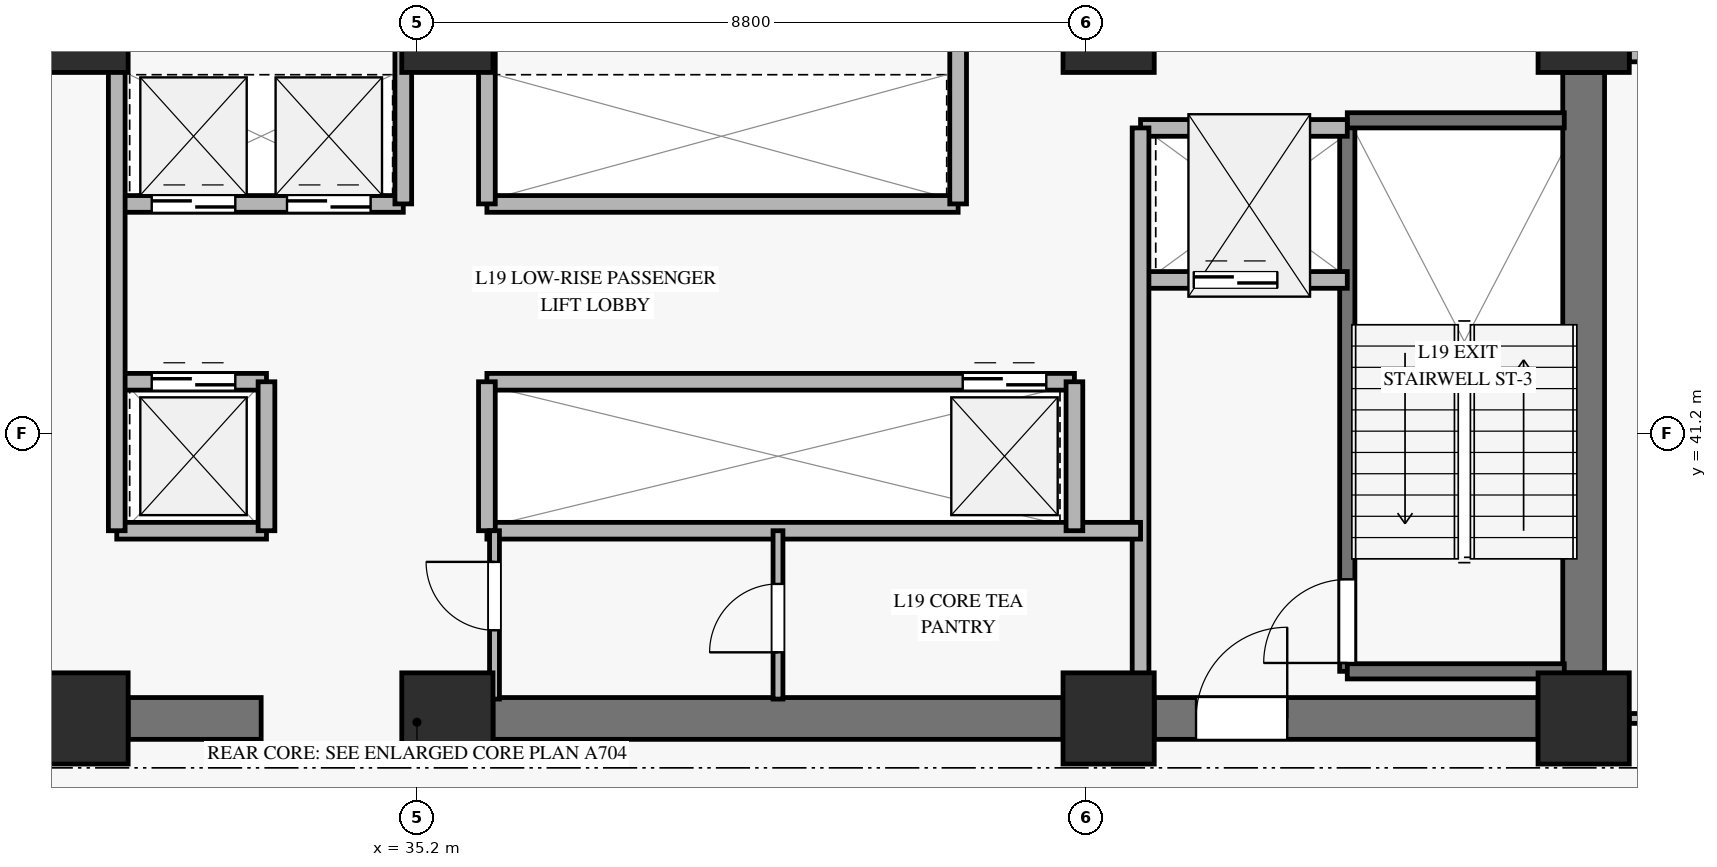
"""IFC4 building model, lengths in metres.
Left out: names, types, materials, properties, quantities, classifications, styles, units other than length and angle.
Written with IfcOpenShell. Run it as: python <this file> out.ifc"""

import sys

from ifc_helpers import new_model, si_unit, direction, frame, frame_2d, origin, origin_2d, place, context, subcontext, project, spatial, rectangle, extrude, source, transform, mapped, element, fill, save


model = new_model("IFC4")
c1 = context("Model", 3, precision=1e-05, world=origin(), true_north=direction((0.0, 1.0)))
c2 = subcontext(c1, "Body", "Model", "MODEL_VIEW")
j1 = project(units=[si_unit("LENGTHUNIT", "METRE"), si_unit("PLANEANGLEUNIT", "RADIAN")], contexts=[c1])
p1 = place(None, origin())
s1 = spatial("IfcSite", under=j1, at=p1, CompositionType="ELEMENT")
p2 = place(p1, origin())
s2 = spatial("IfcBuilding", under=s1, at=p2, CompositionType="ELEMENT")
p3 = place(p2, frame((0.0, 0.0, 79.6)))
s3 = spatial("IfcBuildingStorey", under=s2, at=p3, CompositionType="ELEMENT", Elevation=79.6)
m1 = source(origin(), c2, "Body", "SweptSolid", [
    extrude(rectangle(XDim=1.2, YDim=1.2, at=origin_2d()), origin(), (0.0, 0.0, 1.0), 3.68),
])
for number, where, z_axis, x_axis in (
    (1, (30.8, 37.45, 0.0), (0.0, 0.0, 1.0), (1.0, 0.0, 0.0)),
    (2, (30.8, 46.55, 0.0), (0.0, 0.0, 1.0), (1.0, 0.0, 0.0)),
    (3, (35.6, 37.45, 0.0), (0.0, 0.0, 1.0), (1.0, 0.0, 0.0)),
    (4, (35.6, 46.55, 0.0), (0.0, 0.0, 1.0), (1.0, 0.0, 0.0)),
    (5, (44.3, 37.45, 0.0), (0.0, 0.0, 1.0), (1.0, 0.0, 0.0)),
    (6, (44.3, 46.55, 0.0), (0.0, 0.0, 1.0), (1.0, 0.0, 0.0)),
    (7, (50.55, 37.45, 0.0), (0.0, 0.0, 1.0), (1.0, 0.0, 0.0)),
    (8, (50.55, 46.55, 0.0), (0.0, 0.0, 1.0), (1.0, 0.0, 0.0)),
):
    element("IfcColumn", number, at=place(p3, frame(where, z_axis=z_axis, x_axis=x_axis)), inside=s3, PredefinedType="PILASTER", context=c2, shape_type="MappedRepresentation", body=[
        mapped(m1, transform((0.0, 0.0, 0.0), x_axis=(1.0, 0.0, 0.0), y_axis=(0.0, 1.0, 0.0), z_axis=(0.0, 0.0, 1.0), scale=1.0)),
    ])
p4 = place(p3, frame((31.4, 37.45, 0.0), z_axis=(0.0, 0.0, 1.0), x_axis=(1.0, 0.0, 0.0)))
e9 = element("IfcWall", 9, at=p4, inside=s3, PredefinedType="SHEAR", context=c2, shape_type="SweptSolid", body=[
    extrude(rectangle(XDim=1.75, YDim=0.55, at=frame_2d((0.875, 0.0))), origin(), (0.0, 0.0, 1.0), 3.68),
])
p5 = place(p3, frame((36.2, 37.45, 0.0), z_axis=(0.0, 0.0, 1.0), x_axis=(1.0, 0.0, 0.0)))
e10 = element("IfcWall", 10, at=p5, inside=s3, PredefinedType="SHEAR", context=c2, shape_type="SweptSolid", body=[
    extrude(rectangle(XDim=7.5, YDim=0.55, at=frame_2d((3.75, 0.0))), origin(), (0.0, 0.0, 1.0), 3.68),
])
p6 = place(p3, frame((44.9, 37.45, 0.0), z_axis=(0.0, 0.0, 1.0), x_axis=(1.0, 0.0, 0.0)))
e11 = element("IfcWall", 11, at=p6, inside=s3, PredefinedType="SHEAR", context=c2, shape_type="SweptSolid", body=[
    extrude(rectangle(XDim=5.05, YDim=0.55, at=frame_2d((2.525, 0.0))), origin(), (0.0, 0.0, 1.0), 3.68),
])
p7 = place(p6, frame((0.55, 0.0, 0.0)))
e12 = element("IfcOpeningElement", 12, at=p7, cuts=e11, PredefinedType="OPENING", context=c2, shape_type="SweptSolid", body=[
    extrude(rectangle(XDim=1.2, YDim=2.15, at=frame_2d((0.6, 1.075))), frame((0.0, 0.285, 0.0), z_axis=(0.0, -1.0, 0.0), x_axis=(1.0, 0.0, 0.0)), (0.0, 0.0, 1.0), 0.57),
])
p8 = place(p3, frame((50.55, 38.05, 0.0), z_axis=(0.0, 0.0, 1.0), x_axis=(0.0, 1.0, 0.0)))
e13 = element("IfcWall", 13, at=p8, inside=s3, PredefinedType="SHEAR", context=c2, shape_type="SweptSolid", body=[
    extrude(rectangle(XDim=7.9, YDim=0.55, at=frame_2d((3.95, 0.0))), origin(), (0.0, 0.0, 1.0), 3.68),
])
p9 = place(p3, frame((51.15, 46.25, 0.0), z_axis=(0.0, 0.0, 1.0), x_axis=(1.0, 0.0, 0.0)))
e14 = element("IfcWall", 14, at=p9, inside=s3, PredefinedType="SOLIDWALL", context=c2, shape_type="SweptSolid", body=[
    extrude(rectangle(XDim=11.615, YDim=0.32, at=frame_2d((5.808, 0.0))), origin(), (0.0, 0.0, 1.0), 3.16),
])
p10 = place(p9, frame((5.008, 0.0, 0.45)))
e15 = element("IfcOpeningElement", 15, at=p10, cuts=e14, PredefinedType="OPENING", context=c2, shape_type="SweptSolid", body=[
    extrude(rectangle(XDim=1.6, YDim=2.0, at=frame_2d((0.8, 1.0))), frame((0.0, 0.17, 0.0), z_axis=(0.0, -1.0, 0.0), x_axis=(1.0, 0.0, 0.0)), (0.0, 0.0, 1.0), 0.34),
])
p11 = place(p3, frame((47.44, 38.07, 0.0), z_axis=(0.0, 0.0, 1.0), x_axis=(0.0, 1.0, 0.0)))
e16 = element("IfcWall", 16, at=p11, inside=s3, PredefinedType="SOLIDWALL", context=c2, shape_type="SweptSolid", body=[
    extrude(rectangle(XDim=7.25, YDim=0.2, at=frame_2d((3.625, 0.0))), origin(), (0.0, 0.0, 1.0), 3.9),
])
p12 = place(p11, frame((0.11, 0.0, 0.0)))
e17 = element("IfcOpeningElement", 17, at=p12, cuts=e16, PredefinedType="OPENING", context=c2, shape_type="SweptSolid", body=[
    extrude(rectangle(XDim=1.1, YDim=2.15, at=frame_2d((0.55, 1.075))), frame((0.0, 0.11, 0.0), z_axis=(0.0, -1.0, 0.0), x_axis=(1.0, 0.0, 0.0)), (0.0, 0.0, 1.0), 0.22),
])
for number, where, z_axis, x_axis in (
    (18, (47.44, 45.32, 0.0), (0.0, 0.0, 1.0), (1.0, 0.0, 0.0)),
    (19, (47.44, 38.07, 0.0), (0.0, 0.0, 1.0), (1.0, 0.0, 0.0)),
):
    element("IfcWall", number, at=place(p3, frame(where, z_axis=z_axis, x_axis=x_axis)), inside=s3, PredefinedType="SOLIDWALL", context=c2, shape_type="SweptSolid", body=[
        extrude(rectangle(XDim=2.855, YDim=0.2, at=frame_2d((1.427, 0.0))), origin(), (0.0, 0.0, 1.0), 3.9),
    ])
p13 = place(p3, frame((44.72, 43.22, 0.0), z_axis=(0.0, 0.0, 1.0), x_axis=(1.0, 0.0, 0.0)))
e20 = element("IfcWall", 20, at=p13, inside=s3, PredefinedType="SOLIDWALL", context=c2, shape_type="SweptSolid", body=[
    extrude(rectangle(XDim=2.72, YDim=0.22, at=frame_2d((1.36, 0.0))), origin(), (0.0, 0.0, 1.0), 3.68),
])
p14 = place(p13, frame((0.7, 0.0, 0.0)))
e21 = element("IfcOpeningElement", 21, at=p14, cuts=e20, PredefinedType="OPENING", context=c2, shape_type="SweptSolid", body=[
    extrude(rectangle(XDim=1.1, YDim=2.2, at=frame_2d((0.55, 1.1))), frame((0.0, 0.12, 0.0), z_axis=(0.0, -1.0, 0.0), x_axis=(1.0, 0.0, 0.0)), (0.0, 0.0, 1.0), 0.24),
])
p15 = place(p3, frame((44.72, 45.22, 0.0), z_axis=(0.0, 0.0, 1.0), x_axis=(1.0, 0.0, 0.0)))
e22 = element("IfcWall", 22, at=p15, inside=s3, PredefinedType="SOLIDWALL", context=c2, shape_type="SweptSolid", body=[
    extrude(rectangle(XDim=2.72, YDim=0.22, at=frame_2d((1.36, 0.0))), origin(), (0.0, 0.0, 1.0), 3.68),
])
p16 = place(p3, frame((44.72, 37.705, 0.0), z_axis=(0.0, 0.0, 1.0), x_axis=(0.0, 1.0, 0.0)))
e23 = element("IfcWall", 23, at=p16, inside=s3, PredefinedType="SOLIDWALL", context=c2, shape_type="SweptSolid", body=[
    extrude(rectangle(XDim=7.515, YDim=0.22, at=frame_2d((3.757, 0.0))), origin(), (0.0, 0.0, 1.0), 3.68),
])
p17 = place(p3, frame((31.25, 44.22, 0.0), z_axis=(0.0, 0.0, 1.0), x_axis=(1.0, 0.0, 0.0)))
e24 = element("IfcWall", 24, at=p17, inside=s3, PredefinedType="SOLIDWALL", context=c2, shape_type="SweptSolid", body=[
    extrude(rectangle(XDim=3.77, YDim=0.22, at=frame_2d((1.885, 0.0))), origin(), (0.0, 0.0, 1.0), 3.68),
])
p18 = place(p17, frame((0.46, 0.0, 0.0)))
e25 = element("IfcOpeningElement", 25, at=p18, cuts=e24, PredefinedType="OPENING", context=c2, shape_type="SweptSolid", body=[
    extrude(rectangle(XDim=1.1, YDim=2.2, at=frame_2d((0.55, 1.1))), frame((0.0, 0.12, 0.0), z_axis=(0.0, -1.0, 0.0), x_axis=(1.0, 0.0, 0.0)), (0.0, 0.0, 1.0), 0.24),
])
p19 = place(p17, frame((2.24, 0.0, 0.0)))
e26 = element("IfcOpeningElement", 26, at=p19, cuts=e24, PredefinedType="OPENING", context=c2, shape_type="SweptSolid", body=[
    extrude(rectangle(XDim=1.1, YDim=2.2, at=frame_2d((0.55, 1.1))), frame((0.0, 0.12, 0.0), z_axis=(0.0, -1.0, 0.0), x_axis=(1.0, 0.0, 0.0)), (0.0, 0.0, 1.0), 0.24),
])
p20 = place(p3, frame((36.12, 44.22, 0.0), z_axis=(0.0, 0.0, 1.0), x_axis=(1.0, 0.0, 0.0)))
e27 = element("IfcWall", 27, at=p20, inside=s3, PredefinedType="SOLIDWALL", context=c2, shape_type="SweptSolid", body=[
    extrude(rectangle(XDim=6.2, YDim=0.22, at=frame_2d((3.1, 0.0))), origin(), (0.0, 0.0, 1.0), 3.68),
])
for number, where, z_axis, x_axis in (
    (28, (35.02, 44.22, 0.0), (0.0, 0.0, 1.0), (0.0, 1.0, 0.0)),
    (29, (36.12, 44.22, 0.0), (0.0, 0.0, 1.0), (0.0, 1.0, 0.0)),
    (30, (42.32, 44.22, 0.0), (0.0, 0.0, 1.0), (0.0, 1.0, 0.0)),
):
    element("IfcWall", number, at=place(p3, frame(where, z_axis=z_axis, x_axis=x_axis)), inside=s3, PredefinedType="SOLIDWALL", context=c2, shape_type="SweptSolid", body=[
        extrude(rectangle(XDim=2.075, YDim=0.22, at=frame_2d((1.038, 0.0))), origin(), (0.0, 0.0, 1.0), 3.68),
    ])
p21 = place(p3, frame((31.25, 41.88, 0.0), z_axis=(0.0, 0.0, 1.0), x_axis=(1.0, 0.0, 0.0)))
e31 = element("IfcWall", 31, at=p21, inside=s3, PredefinedType="SOLIDWALL", context=c2, shape_type="SweptSolid", body=[
    extrude(rectangle(XDim=1.97, YDim=0.22, at=frame_2d((0.985, 0.0))), origin(), (0.0, 0.0, 1.0), 3.68),
])
p22 = place(p21, frame((0.46, 0.0, 0.0)))
e32 = element("IfcOpeningElement", 32, at=p22, cuts=e31, PredefinedType="OPENING", context=c2, shape_type="SweptSolid", body=[
    extrude(rectangle(XDim=1.1, YDim=2.2, at=frame_2d((0.55, 1.1))), frame((0.0, 0.12, 0.0), z_axis=(0.0, -1.0, 0.0), x_axis=(1.0, 0.0, 0.0)), (0.0, 0.0, 1.0), 0.24),
])
p23 = place(p3, frame((36.12, 41.88, 0.0), z_axis=(0.0, 0.0, 1.0), x_axis=(1.0, 0.0, 0.0)))
e33 = element("IfcWall", 33, at=p23, inside=s3, PredefinedType="SOLIDWALL", context=c2, shape_type="SweptSolid", body=[
    extrude(rectangle(XDim=7.73, YDim=0.22, at=frame_2d((3.865, 0.0))), origin(), (0.0, 0.0, 1.0), 3.68),
])
p24 = place(p23, frame((6.26, 0.0, 0.0)))
e34 = element("IfcOpeningElement", 34, at=p24, cuts=e33, PredefinedType="OPENING", context=c2, shape_type="SweptSolid", body=[
    extrude(rectangle(XDim=1.1, YDim=2.2, at=frame_2d((0.55, 1.1))), frame((0.0, 0.12, 0.0), z_axis=(0.0, -1.0, 0.0), x_axis=(1.0, 0.0, 0.0)), (0.0, 0.0, 1.0), 0.24),
])
p25 = place(p3, frame((31.25, 39.92, 0.0), z_axis=(0.0, 0.0, 1.0), x_axis=(1.0, 0.0, 0.0)))
e35 = element("IfcWall", 35, at=p25, inside=s3, PredefinedType="SOLIDWALL", context=c2, shape_type="SweptSolid", body=[
    extrude(rectangle(XDim=1.97, YDim=0.22, at=frame_2d((0.985, 0.0))), origin(), (0.0, 0.0, 1.0), 3.68),
])
p26 = place(p3, frame((33.22, 39.92, 0.0), z_axis=(0.0, 0.0, 1.0), x_axis=(0.0, 1.0, 0.0)))
e36 = element("IfcWall", 36, at=p26, inside=s3, PredefinedType="SOLIDWALL", context=c2, shape_type="SweptSolid", body=[
    extrude(rectangle(XDim=1.96, YDim=0.22, at=frame_2d((0.98, 0.0))), origin(), (0.0, 0.0, 1.0), 3.68),
])
p27 = place(p3, frame((36.12, 39.92, 0.0), z_axis=(0.0, 0.0, 1.0), x_axis=(1.0, 0.0, 0.0)))
e37 = element("IfcWall", 37, at=p27, inside=s3, PredefinedType="SOLIDWALL", context=c2, shape_type="SweptSolid", body=[
    extrude(rectangle(XDim=8.6, YDim=0.22, at=frame_2d((4.3, 0.0))), origin(), (0.0, 0.0, 1.0), 2.965),
])
p28 = place(p3, frame((36.12, 39.92, 0.0), z_axis=(0.0, 0.0, 1.0), x_axis=(0.0, 1.0, 0.0)))
e38 = element("IfcWall", 38, at=p28, inside=s3, PredefinedType="SOLIDWALL", context=c2, shape_type="SweptSolid", body=[
    extrude(rectangle(XDim=1.96, YDim=0.22, at=frame_2d((0.98, 0.0))), origin(), (0.0, 0.0, 1.0), 3.68),
])
p29 = place(p3, frame((31.25, 39.92, 0.0), z_axis=(0.0, 0.0, 1.0), x_axis=(0.0, 1.0, 0.0)))
e39 = element("IfcWall", 39, at=p29, inside=s3, PredefinedType="SOLIDWALL", context=c2, shape_type="SweptSolid", body=[
    extrude(rectangle(XDim=6.375, YDim=0.22, at=frame_2d((3.188, 0.0))), origin(), (0.0, 0.0, 1.0), 3.68),
])
p30 = place(p3, frame((43.85, 39.92, 0.0), z_axis=(0.0, 0.0, 1.0), x_axis=(0.0, 1.0, 0.0)))
e40 = element("IfcWall", 40, at=p30, inside=s3, PredefinedType="SOLIDWALL", context=c2, shape_type="SweptSolid", body=[
    extrude(rectangle(XDim=1.96, YDim=0.22, at=frame_2d((0.98, 0.0))), origin(), (0.0, 0.0, 1.0), 3.68),
])
p31 = place(p3, frame((36.22, 37.705, 0.0), z_axis=(0.0, 0.0, 1.0), x_axis=(0.0, 1.0, 0.0)))
e41 = element("IfcWall", 41, at=p31, inside=s3, PredefinedType="PARTITIONING", context=c2, shape_type="SweptSolid", body=[
    extrude(rectangle(XDim=2.215, YDim=0.13, at=frame_2d((1.107, 0.0))), origin(), (0.0, 0.0, 1.0), 3.68),
])
p32 = place(p31, frame((0.905, 0.0, 0.0)))
e42 = element("IfcOpeningElement", 42, at=p32, cuts=e41, PredefinedType="OPENING", context=c2, shape_type="SweptSolid", body=[
    extrude(rectangle(XDim=0.9, YDim=2.1, at=frame_2d((0.45, 1.05))), frame((0.0, 0.075, 0.0), z_axis=(0.0, -1.0, 0.0), x_axis=(1.0, 0.0, 0.0)), (0.0, 0.0, 1.0), 0.15),
])
p33 = place(p3, frame((39.95, 37.705, 0.0), z_axis=(0.0, 0.0, 1.0), x_axis=(0.0, 1.0, 0.0)))
e43 = element("IfcWall", 43, at=p33, inside=s3, PredefinedType="PARTITIONING", context=c2, shape_type="SweptSolid", body=[
    extrude(rectangle(XDim=2.215, YDim=0.13, at=frame_2d((1.107, 0.0))), origin(), (0.0, 0.0, 1.0), 3.68),
])
p34 = place(p33, frame((0.615, 0.0, 0.0)))
e44 = element("IfcOpeningElement", 44, at=p34, cuts=e43, PredefinedType="OPENING", context=c2, shape_type="SweptSolid", body=[
    extrude(rectangle(XDim=0.9, YDim=2.1, at=frame_2d((0.45, 1.05))), frame((0.0, 0.075, 0.0), z_axis=(0.0, -1.0, 0.0), x_axis=(1.0, 0.0, 0.0)), (0.0, 0.0, 1.0), 0.15),
])
p35 = place(p3, frame((51.15, 37.45, 0.0), z_axis=(0.0, 0.0, 1.0), x_axis=(1.0, 0.0, 0.0)))
e45 = element("IfcWall", 45, at=p35, inside=s3, PredefinedType="PARTITIONING", context=c2, shape_type="SweptSolid", body=[
    extrude(rectangle(XDim=15.211, YDim=0.13, at=frame_2d((7.605, 0.0))), origin(), (0.0, 0.0, 1.0), 3.165),
])
p36 = place(p35, frame((0.5, 0.0, 0.0)))
e46 = element("IfcOpeningElement", 46, at=p36, cuts=e45, PredefinedType="OPENING", context=c2, shape_type="SweptSolid", body=[
    extrude(rectangle(XDim=0.9, YDim=2.1, at=frame_2d((0.45, 1.05))), frame((0.0, 0.075, 0.0), z_axis=(0.0, -1.0, 0.0), x_axis=(1.0, 0.0, 0.0)), (0.0, 0.0, 1.0), 0.15),
])
p37 = place(p35, frame((11.088, 0.0, 0.0)))
e47 = element("IfcOpeningElement", 47, at=p37, cuts=e45, PredefinedType="OPENING", context=c2, shape_type="SweptSolid", body=[
    extrude(rectangle(XDim=0.95, YDim=2.1, at=frame_2d((0.475, 1.05))), frame((0.0, 0.075, 0.0), z_axis=(0.0, -1.0, 0.0), x_axis=(1.0, 0.0, 0.0)), (0.0, 0.0, 1.0), 0.15),
])
m2 = source(origin(), c2, "Body", "SweptSolid", [
    extrude(rectangle(XDim=1.1, YDim=2.15, at=frame_2d((0.55, 1.075))), frame((0.0, 0.025, 0.0), z_axis=(0.0, -1.0, 0.0), x_axis=(1.0, 0.0, 0.0)), (0.0, 0.0, 1.0), 0.05),
])
p38 = place(p12, origin())
e48 = element("IfcDoor", 48, at=p38, inside=s3, OperationType="SINGLE_SWING_LEFT", PredefinedType="DOOR", context=c2, shape_type="MappedRepresentation", body=[
    mapped(m2, transform((0.0, 0.0, 0.0), x_axis=(1.0, 0.0, 0.0), y_axis=(0.0, 1.0, 0.0), z_axis=(0.0, 0.0, 1.0), scale=1.0)),
])
fill(e17, e48)
m3 = source(origin(), c2, "Body", "SweptSolid", [
    extrude(rectangle(XDim=1.1, YDim=2.2, at=frame_2d((0.55, 1.1))), frame((0.0, 0.025, 0.0), z_axis=(0.0, -1.0, 0.0), x_axis=(1.0, 0.0, 0.0)), (0.0, 0.0, 1.0), 0.05),
])
p39 = place(p14, origin())
e49 = element("IfcDoor", 49, at=p39, inside=s3, OperationType="SLIDING_TO_LEFT", PredefinedType="DOOR", context=c2, shape_type="MappedRepresentation", body=[
    mapped(m3, transform((0.0, 0.0, 0.0), x_axis=(1.0, 0.0, 0.0), y_axis=(0.0, 1.0, 0.0), z_axis=(0.0, 0.0, 1.0), scale=1.0)),
])
fill(e21, e49)
m4 = source(origin(), c2, "Body", "SweptSolid", [
    extrude(rectangle(XDim=1.2, YDim=2.15, at=frame_2d((0.6, 1.075))), frame((0.0, 0.025, 0.0), z_axis=(0.0, -1.0, 0.0), x_axis=(1.0, 0.0, 0.0)), (0.0, 0.0, 1.0), 0.05),
])
p40 = place(p7, origin())
e50 = element("IfcDoor", 50, at=p40, inside=s3, OperationType="SINGLE_SWING_RIGHT", PredefinedType="DOOR", context=c2, shape_type="MappedRepresentation", body=[
    mapped(m4, transform((0.0, 0.0, 0.0), x_axis=(1.0, 0.0, 0.0), y_axis=(0.0, 1.0, 0.0), z_axis=(0.0, 0.0, 1.0), scale=1.0)),
])
fill(e12, e50)
p41 = place(p18, origin())
e51 = element("IfcDoor", 51, at=p41, inside=s3, OperationType="SLIDING_TO_LEFT", PredefinedType="DOOR", context=c2, shape_type="MappedRepresentation", body=[
    mapped(m3, transform((0.0, 0.0, 0.0), x_axis=(1.0, 0.0, 0.0), y_axis=(0.0, 1.0, 0.0), z_axis=(0.0, 0.0, 1.0), scale=1.0)),
])
fill(e25, e51)
p42 = place(p19, origin())
e52 = element("IfcDoor", 52, at=p42, inside=s3, OperationType="SLIDING_TO_LEFT", PredefinedType="DOOR", context=c2, shape_type="MappedRepresentation", body=[
    mapped(m3, transform((0.0, 0.0, 0.0), x_axis=(1.0, 0.0, 0.0), y_axis=(0.0, 1.0, 0.0), z_axis=(0.0, 0.0, 1.0), scale=1.0)),
])
fill(e26, e52)
p43 = place(p22, origin())
e53 = element("IfcDoor", 53, at=p43, inside=s3, OperationType="SLIDING_TO_LEFT", PredefinedType="DOOR", context=c2, shape_type="MappedRepresentation", body=[
    mapped(m3, transform((0.0, 0.0, 0.0), x_axis=(1.0, 0.0, 0.0), y_axis=(0.0, 1.0, 0.0), z_axis=(0.0, 0.0, 1.0), scale=1.0)),
])
fill(e32, e53)
p44 = place(p24, origin())
e54 = element("IfcDoor", 54, at=p44, inside=s3, OperationType="SLIDING_TO_LEFT", PredefinedType="DOOR", context=c2, shape_type="MappedRepresentation", body=[
    mapped(m3, transform((0.0, 0.0, 0.0), x_axis=(1.0, 0.0, 0.0), y_axis=(0.0, 1.0, 0.0), z_axis=(0.0, 0.0, 1.0), scale=1.0)),
])
fill(e34, e54)
m5 = source(origin(), c2, "Body", "SweptSolid", [
    extrude(rectangle(XDim=0.9, YDim=2.1, at=frame_2d((0.45, 1.05))), frame((0.0, 0.025, 0.0), z_axis=(0.0, -1.0, 0.0), x_axis=(1.0, 0.0, 0.0)), (0.0, 0.0, 1.0), 0.05),
])
p45 = place(p32, origin())
e55 = element("IfcDoor", 55, at=p45, inside=s3, OperationType="SINGLE_SWING_RIGHT", PredefinedType="DOOR", context=c2, shape_type="MappedRepresentation", body=[
    mapped(m5, transform((0.0, 0.0, 0.0), x_axis=(1.0, 0.0, 0.0), y_axis=(0.0, 1.0, 0.0), z_axis=(0.0, 0.0, 1.0), scale=1.0)),
])
fill(e42, e55)
p46 = place(p34, origin())
e56 = element("IfcDoor", 56, at=p46, inside=s3, OperationType="SINGLE_SWING_LEFT", PredefinedType="DOOR", context=c2, shape_type="MappedRepresentation", body=[
    mapped(m5, transform((0.0, 0.0, 0.0), x_axis=(1.0, 0.0, 0.0), y_axis=(0.0, 1.0, 0.0), z_axis=(0.0, 0.0, 1.0), scale=1.0)),
])
fill(e44, e56)
save(model, sys.argv[1])
